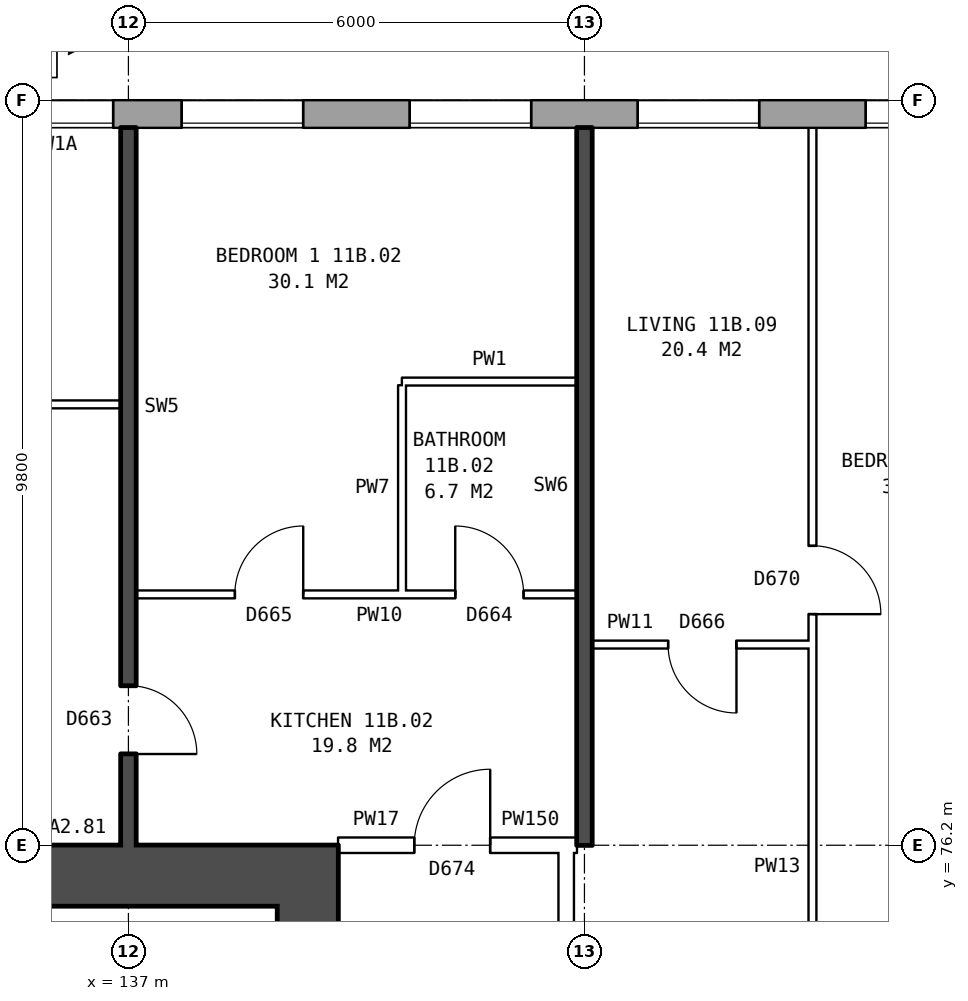
"""IFC4 building model, lengths in metres.
Left out: names, types, materials, properties, quantities, classifications, styles, units other than length and angle.
Written with IfcOpenShell. Run it as: python <this file> out.ifc"""

import sys

from ifc_helpers import new_model, si_unit, direction, frame, frame_2d, origin, place, context, subcontext, project, spatial, rectangle, extrude, element, fill, save


model = new_model("IFC4")
c1 = context("Model", 3, precision=1e-05, world=origin(), true_north=direction((0.0, 1.0)))
c2 = subcontext(c1, "Body", "Model", "MODEL_VIEW")
j1 = project(units=[si_unit("LENGTHUNIT", "METRE"), si_unit("PLANEANGLEUNIT", "RADIAN")], contexts=[c1])
p1 = place(None, origin())
s1 = spatial("IfcSite", under=j1, at=p1, CompositionType="ELEMENT")
p2 = place(p1, origin())
s2 = spatial("IfcBuilding", under=s1, at=p2, CompositionType="ELEMENT")
p3 = place(p2, frame((0.0, 0.0, 44.3)))
s3 = spatial("IfcBuildingStorey", under=s2, at=p3, CompositionType="ELEMENT", Elevation=44.3)
p4 = place(p3, frame((173.425, 85.82, 0.0), z_axis=(0.0, 0.0, 1.0), x_axis=(-1.0, 0.0, 0.0)))
e1 = element("IfcWall", 1, at=p4, inside=s3, PredefinedType="STANDARD", context=c2, shape_type="SweptSolid", body=[
    extrude(rectangle(XDim=39.351, YDim=0.36, at=frame_2d((19.675, 0.0))), origin(), (0.0, 0.0, 1.0), 2.85),
])
p5 = place(p4, frame((1.125, 0.0, 0.8)))
e2 = element("IfcOpeningElement", 2, at=p5, cuts=e1, PredefinedType="OPENING", context=c2, shape_type="SweptSolid", body=[
    extrude(rectangle(XDim=1.6, YDim=1.8, at=frame_2d((0.8, 0.9))), frame((0.0, 0.19, 0.0), z_axis=(0.0, -1.0, 0.0), x_axis=(1.0, 0.0, 0.0)), (0.0, 0.0, 1.0), 0.38),
])
p6 = place(p4, frame((4.125, 0.0, 0.8)))
e3 = element("IfcOpeningElement", 3, at=p6, cuts=e1, PredefinedType="OPENING", context=c2, shape_type="SweptSolid", body=[
    extrude(rectangle(XDim=1.6, YDim=1.8, at=frame_2d((0.8, 0.9))), frame((0.0, 0.19, 0.0), z_axis=(0.0, -1.0, 0.0), x_axis=(1.0, 0.0, 0.0)), (0.0, 0.0, 1.0), 0.38),
])
p7 = place(p4, frame((7.125, 0.0, 0.8)))
e4 = element("IfcOpeningElement", 4, at=p7, cuts=e1, PredefinedType="OPENING", context=c2, shape_type="SweptSolid", body=[
    extrude(rectangle(XDim=1.6, YDim=1.8, at=frame_2d((0.8, 0.9))), frame((0.0, 0.19, 0.0), z_axis=(0.0, -1.0, 0.0), x_axis=(1.0, 0.0, 0.0)), (0.0, 0.0, 1.0), 0.38),
])
p8 = place(p4, frame((10.125, 0.0, 0.8)))
e5 = element("IfcOpeningElement", 5, at=p8, cuts=e1, PredefinedType="OPENING", context=c2, shape_type="SweptSolid", body=[
    extrude(rectangle(XDim=1.6, YDim=1.8, at=frame_2d((0.8, 0.9))), frame((0.0, 0.19, 0.0), z_axis=(0.0, -1.0, 0.0), x_axis=(1.0, 0.0, 0.0)), (0.0, 0.0, 1.0), 0.38),
])
p9 = place(p4, frame((13.125, 0.0, 0.8)))
e6 = element("IfcOpeningElement", 6, at=p9, cuts=e1, PredefinedType="OPENING", context=c2, shape_type="SweptSolid", body=[
    extrude(rectangle(XDim=1.6, YDim=1.8, at=frame_2d((0.8, 0.9))), frame((0.0, 0.19, 0.0), z_axis=(0.0, -1.0, 0.0), x_axis=(1.0, 0.0, 0.0)), (0.0, 0.0, 1.0), 0.38),
])
p10 = place(p4, frame((16.125, 0.0, 0.8)))
e7 = element("IfcOpeningElement", 7, at=p10, cuts=e1, PredefinedType="OPENING", context=c2, shape_type="SweptSolid", body=[
    extrude(rectangle(XDim=1.6, YDim=1.8, at=frame_2d((0.8, 0.9))), frame((0.0, 0.19, 0.0), z_axis=(0.0, -1.0, 0.0), x_axis=(1.0, 0.0, 0.0)), (0.0, 0.0, 1.0), 0.38),
])
p11 = place(p4, frame((19.125, 0.0, 0.8)))
e8 = element("IfcOpeningElement", 8, at=p11, cuts=e1, PredefinedType="OPENING", context=c2, shape_type="SweptSolid", body=[
    extrude(rectangle(XDim=1.6, YDim=1.8, at=frame_2d((0.8, 0.9))), frame((0.0, 0.19, 0.0), z_axis=(0.0, -1.0, 0.0), x_axis=(1.0, 0.0, 0.0)), (0.0, 0.0, 1.0), 0.38),
])
p12 = place(p4, frame((22.125, 0.0, 0.8)))
e9 = element("IfcOpeningElement", 9, at=p12, cuts=e1, PredefinedType="OPENING", context=c2, shape_type="SweptSolid", body=[
    extrude(rectangle(XDim=1.6, YDim=1.8, at=frame_2d((0.8, 0.9))), frame((0.0, 0.19, 0.0), z_axis=(0.0, -1.0, 0.0), x_axis=(1.0, 0.0, 0.0)), (0.0, 0.0, 1.0), 0.38),
])
p13 = place(p4, frame((25.125, 0.0, 0.8)))
e10 = element("IfcOpeningElement", 10, at=p13, cuts=e1, PredefinedType="OPENING", context=c2, shape_type="SweptSolid", body=[
    extrude(rectangle(XDim=1.6, YDim=1.8, at=frame_2d((0.8, 0.9))), frame((0.0, 0.19, 0.0), z_axis=(0.0, -1.0, 0.0), x_axis=(1.0, 0.0, 0.0)), (0.0, 0.0, 1.0), 0.38),
])
p14 = place(p4, frame((28.125, 0.0, 0.8)))
e11 = element("IfcOpeningElement", 11, at=p14, cuts=e1, PredefinedType="OPENING", context=c2, shape_type="SweptSolid", body=[
    extrude(rectangle(XDim=1.6, YDim=1.8, at=frame_2d((0.8, 0.9))), frame((0.0, 0.19, 0.0), z_axis=(0.0, -1.0, 0.0), x_axis=(1.0, 0.0, 0.0)), (0.0, 0.0, 1.0), 0.38),
])
p15 = place(p4, frame((31.125, 0.0, 0.8)))
e12 = element("IfcOpeningElement", 12, at=p15, cuts=e1, PredefinedType="OPENING", context=c2, shape_type="SweptSolid", body=[
    extrude(rectangle(XDim=1.6, YDim=1.8, at=frame_2d((0.8, 0.9))), frame((0.0, 0.19, 0.0), z_axis=(0.0, -1.0, 0.0), x_axis=(1.0, 0.0, 0.0)), (0.0, 0.0, 1.0), 0.38),
])
p16 = place(p4, frame((34.125, 0.0, 0.8)))
e13 = element("IfcOpeningElement", 13, at=p16, cuts=e1, PredefinedType="OPENING", context=c2, shape_type="SweptSolid", body=[
    extrude(rectangle(XDim=1.6, YDim=1.8, at=frame_2d((0.8, 0.9))), frame((0.0, 0.19, 0.0), z_axis=(0.0, -1.0, 0.0), x_axis=(1.0, 0.0, 0.0)), (0.0, 0.0, 1.0), 0.38),
])
p17 = place(p4, frame((36.625, 0.0, 0.8)))
e14 = element("IfcOpeningElement", 14, at=p17, cuts=e1, PredefinedType="OPENING", context=c2, shape_type="SweptSolid", body=[
    extrude(rectangle(XDim=1.4, YDim=1.8, at=frame_2d((0.7, 0.9))), frame((0.0, 0.19, 0.0), z_axis=(0.0, -1.0, 0.0), x_axis=(1.0, 0.0, 0.0)), (0.0, 0.0, 1.0), 0.38),
])
p18 = place(p4, frame((38.325, 0.0, 0.8)))
e15 = element("IfcOpeningElement", 15, at=p18, cuts=e1, PredefinedType="OPENING", context=c2, shape_type="SweptSolid", body=[
    extrude(rectangle(XDim=0.6, YDim=0.9, at=frame_2d((0.3, 0.45))), frame((0.0, 0.19, 0.0), z_axis=(0.0, -1.0, 0.0), x_axis=(1.0, 0.0, 0.0)), (0.0, 0.0, 1.0), 0.38),
])
p19 = place(p3, frame((139.36, 64.6, 0.0), z_axis=(0.0, 0.0, 1.0), x_axis=(0.0, 1.0, 0.0)))
e16 = element("IfcWall", 16, at=p19, inside=s3, PredefinedType="SHEAR", context=c2, shape_type="SweptSolid", body=[
    extrude(rectangle(XDim=10.8, YDim=0.8, at=frame_2d((5.4, 0.0))), origin(), (0.0, 0.0, 1.0), 2.85),
])
p20 = place(p19, frame((0.525, 0.0, 0.0)))
e17 = element("IfcOpeningElement", 17, at=p20, cuts=e16, PredefinedType="OPENING", context=c2, shape_type="SweptSolid", body=[
    extrude(rectangle(XDim=1.1, YDim=2.1, at=frame_2d((0.55, 1.05))), frame((0.0, 0.41, 0.0), z_axis=(0.0, -1.0, 0.0), x_axis=(1.0, 0.0, 0.0)), (0.0, 0.0, 1.0), 0.82),
])
p21 = place(p19, frame((9.1, 0.0, 0.0)))
e18 = element("IfcOpeningElement", 18, at=p21, cuts=e16, PredefinedType="OPENING", context=c2, shape_type="SweptSolid", body=[
    extrude(rectangle(XDim=1.1, YDim=2.1, at=frame_2d((0.55, 1.05))), frame((0.0, 0.41, 0.0), z_axis=(0.0, -1.0, 0.0), x_axis=(1.0, 0.0, 0.0)), (0.0, 0.0, 1.0), 0.82),
])
p22 = place(p19, frame((7.325, 0.0, 0.0)))
e19 = element("IfcOpeningElement", 19, at=p22, cuts=e16, PredefinedType="OPENING", context=c2, shape_type="SweptSolid", body=[
    extrude(rectangle(XDim=0.85, YDim=2.1, at=frame_2d((0.425, 1.05))), frame((0.0, 0.41, 0.0), z_axis=(0.0, -1.0, 0.0), x_axis=(1.0, 0.0, 0.0)), (0.0, 0.0, 1.0), 0.82),
])
p23 = place(p3, frame((139.76, 75.8, 0.0), z_axis=(0.0, 0.0, 1.0), x_axis=(-1.0, 0.0, 0.0)))
e20 = element("IfcWall", 20, at=p23, inside=s3, PredefinedType="SHEAR", context=c2, shape_type="SweptSolid", body=[
    extrude(rectangle(XDim=8.4, YDim=0.8, at=frame_2d((4.2, 0.0))), origin(), (0.0, 0.0, 1.0), 2.85),
])
p24 = place(p3, frame((142.76, 63.9, 0.0), z_axis=(0.0, 0.0, 1.0), x_axis=(0.0, 1.0, 0.0)))
e21 = element("IfcWall", 21, at=p24, inside=s3, PredefinedType="PARTITIONING", context=c2, shape_type="SweptSolid", body=[
    extrude(rectangle(XDim=12.2, YDim=0.2, at=frame_2d((6.1, 0.0))), origin(), (0.0, 0.0, 1.0), 2.85),
])
p25 = place(p24, frame((5.1, 0.0, 0.0)))
e22 = element("IfcOpeningElement", 22, at=p25, cuts=e21, PredefinedType="OPENING", context=c2, shape_type="SweptSolid", body=[
    extrude(rectangle(XDim=2.0, YDim=2.1, at=frame_2d((1.0, 1.05))), frame((0.0, 0.11, 0.0), z_axis=(0.0, -1.0, 0.0), x_axis=(1.0, 0.0, 0.0)), (0.0, 0.0, 1.0), 0.22),
])
p26 = place(p3, frame((139.76, 76.2, 0.0), z_axis=(0.0, 0.0, 1.0), x_axis=(1.0, 0.0, 0.0)))
e23 = element("IfcWall", 23, at=p26, inside=s3, PredefinedType="PARTITIONING", context=c2, shape_type="SweptSolid", body=[
    extrude(rectangle(XDim=3.0, YDim=0.2, at=frame_2d((1.5, 0.0))), origin(), (0.0, 0.0, 1.0), 2.85),
])
p27 = place(p26, frame((1.0, 0.0, 0.0)))
e24 = element("IfcOpeningElement", 24, at=p27, cuts=e23, PredefinedType="OPENING", context=c2, shape_type="SweptSolid", body=[
    extrude(rectangle(XDim=1.0, YDim=2.1, at=frame_2d((0.5, 1.05))), frame((0.0, 0.11, 0.0), z_axis=(0.0, -1.0, 0.0), x_axis=(1.0, 0.0, 0.0)), (0.0, 0.0, 1.0), 0.22),
])
p28 = place(p3, frame((142.76, 76.2, 0.0), z_axis=(0.0, 0.0, 1.0), x_axis=(1.0, 0.0, 0.0)))
e25 = element("IfcWall", 25, at=p28, inside=s3, PredefinedType="PARTITIONING", context=c2, shape_type="SweptSolid", body=[
    extrude(rectangle(XDim=0.14, YDim=0.2, at=frame_2d((0.07, 0.0))), origin(), (0.0, 0.0, 1.0), 2.85),
])
p29 = place(p3, frame((143.1, 78.84, 0.0), z_axis=(0.0, 0.0, 1.0), x_axis=(1.0, 0.0, 0.0)))
e26 = element("IfcWall", 26, at=p29, inside=s3, PredefinedType="PARTITIONING", context=c2, shape_type="SweptSolid", body=[
    extrude(rectangle(XDim=2.9, YDim=0.1, at=frame_2d((1.45, 0.0))), origin(), (0.0, 0.0, 1.0), 2.85),
])
p30 = place(p29, frame((1.0, 0.0, 0.0)))
e27 = element("IfcOpeningElement", 27, at=p30, cuts=e26, PredefinedType="OPENING", context=c2, shape_type="SweptSolid", body=[
    extrude(rectangle(XDim=0.9, YDim=2.1, at=frame_2d((0.45, 1.05))), frame((0.0, 0.06, 0.0), z_axis=(0.0, -1.0, 0.0), x_axis=(1.0, 0.0, 0.0)), (0.0, 0.0, 1.0), 0.12),
])
p31 = place(p3, frame((137.1, 79.5, 0.0), z_axis=(0.0, 0.0, 1.0), x_axis=(1.0, 0.0, 0.0)))
e28 = element("IfcWall", 28, at=p31, inside=s3, PredefinedType="PARTITIONING", context=c2, shape_type="SweptSolid", body=[
    extrude(rectangle(XDim=5.8, YDim=0.1, at=frame_2d((2.9, 0.0))), origin(), (0.0, 0.0, 1.0), 2.85),
])
p32 = place(p31, frame((1.3, 0.0, 0.0)))
e29 = element("IfcOpeningElement", 29, at=p32, cuts=e28, PredefinedType="OPENING", context=c2, shape_type="SweptSolid", body=[
    extrude(rectangle(XDim=0.9, YDim=2.1, at=frame_2d((0.45, 1.05))), frame((0.0, 0.06, 0.0), z_axis=(0.0, -1.0, 0.0), x_axis=(1.0, 0.0, 0.0)), (0.0, 0.0, 1.0), 0.12),
])
p33 = place(p31, frame((4.2, 0.0, 0.0)))
e30 = element("IfcOpeningElement", 30, at=p33, cuts=e28, PredefinedType="OPENING", context=c2, shape_type="SweptSolid", body=[
    extrude(rectangle(XDim=0.9, YDim=2.1, at=frame_2d((0.45, 1.05))), frame((0.0, 0.06, 0.0), z_axis=(0.0, -1.0, 0.0), x_axis=(1.0, 0.0, 0.0)), (0.0, 0.0, 1.0), 0.12),
])
p34 = place(p3, frame((131.36, 82.0, 0.0), z_axis=(0.0, 0.0, 1.0), x_axis=(1.0, 0.0, 0.0)))
e31 = element("IfcWall", 31, at=p34, inside=s3, PredefinedType="PARTITIONING", context=c2, shape_type="SweptSolid", body=[
    extrude(rectangle(XDim=5.54, YDim=0.1, at=frame_2d((2.77, 0.0))), origin(), (0.0, 0.0, 1.0), 2.85),
])
p35 = place(p34, frame((2.32, 0.0, 0.0)))
e32 = element("IfcOpeningElement", 32, at=p35, cuts=e31, PredefinedType="OPENING", context=c2, shape_type="SweptSolid", body=[
    extrude(rectangle(XDim=0.9, YDim=2.1, at=frame_2d((0.45, 1.05))), frame((0.0, 0.06, 0.0), z_axis=(0.0, -1.0, 0.0), x_axis=(1.0, 0.0, 0.0)), (0.0, 0.0, 1.0), 0.12),
])
p36 = place(p3, frame((140.6, 82.3, 0.0), z_axis=(0.0, 0.0, 1.0), x_axis=(1.0, 0.0, 0.0)))
e33 = element("IfcWall", 33, at=p36, inside=s3, PredefinedType="PARTITIONING", context=c2, shape_type="SweptSolid", body=[
    extrude(rectangle(XDim=2.3, YDim=0.1, at=frame_2d((1.15, 0.0))), origin(), (0.0, 0.0, 1.0), 2.85),
])
p37 = place(p3, frame((137.0, 76.2, 0.0), z_axis=(0.0, 0.0, 1.0), x_axis=(0.0, 1.0, 0.0)))
e34 = element("IfcWall", 34, at=p37, inside=s3, PredefinedType="SOLIDWALL", context=c2, shape_type="SweptSolid", body=[
    extrude(rectangle(XDim=9.44, YDim=0.2, at=frame_2d((4.72, 0.0))), origin(), (0.0, 0.0, 1.0), 2.85),
])
p38 = place(p37, frame((1.2, 0.0, 0.0)))
e35 = element("IfcOpeningElement", 35, at=p38, cuts=e34, PredefinedType="OPENING", context=c2, shape_type="SweptSolid", body=[
    extrude(rectangle(XDim=0.9, YDim=2.1, at=frame_2d((0.45, 1.05))), frame((0.0, 0.11, 0.0), z_axis=(0.0, -1.0, 0.0), x_axis=(1.0, 0.0, 0.0)), (0.0, 0.0, 1.0), 0.22),
])
p39 = place(p3, frame((140.6, 79.55, 0.0), z_axis=(0.0, 0.0, 1.0), x_axis=(0.0, 1.0, 0.0)))
e36 = element("IfcWall", 36, at=p39, inside=s3, PredefinedType="PARTITIONING", context=c2, shape_type="SweptSolid", body=[
    extrude(rectangle(XDim=2.7, YDim=0.1, at=frame_2d((1.35, 0.0))), origin(), (0.0, 0.0, 1.0), 2.85),
])
p40 = place(p3, frame((143.0, 76.2, 0.0), z_axis=(0.0, 0.0, 1.0), x_axis=(0.0, 1.0, 0.0)))
e37 = element("IfcWall", 37, at=p40, inside=s3, PredefinedType="SOLIDWALL", context=c2, shape_type="SweptSolid", body=[
    extrude(rectangle(XDim=9.44, YDim=0.2, at=frame_2d((4.72, 0.0))), origin(), (0.0, 0.0, 1.0), 2.85),
])
p41 = place(p3, frame((146.0, 71.3, 0.0), z_axis=(0.0, 0.0, 1.0), x_axis=(0.0, 1.0, 0.0)))
e38 = element("IfcWall", 38, at=p41, inside=s3, PredefinedType="PARTITIONING", context=c2, shape_type="SweptSolid", body=[
    extrude(rectangle(XDim=14.34, YDim=0.1, at=frame_2d((7.17, 0.0))), origin(), (0.0, 0.0, 1.0), 2.85),
])
p42 = place(p41, frame((7.94, 0.0, 0.0)))
e39 = element("IfcOpeningElement", 39, at=p42, cuts=e38, PredefinedType="OPENING", context=c2, shape_type="SweptSolid", body=[
    extrude(rectangle(XDim=0.9, YDim=2.1, at=frame_2d((0.45, 1.05))), frame((0.0, 0.06, 0.0), z_axis=(0.0, -1.0, 0.0), x_axis=(1.0, 0.0, 0.0)), (0.0, 0.0, 1.0), 0.12),
])
p43 = place(p41, frame((0.4, 0.0, 0.0)))
e40 = element("IfcOpeningElement", 40, at=p43, cuts=e38, PredefinedType="OPENING", context=c2, shape_type="SweptSolid", body=[
    extrude(rectangle(XDim=0.9, YDim=2.1, at=frame_2d((0.45, 1.05))), frame((0.0, 0.06, 0.0), z_axis=(0.0, -1.0, 0.0), x_axis=(1.0, 0.0, 0.0)), (0.0, 0.0, 1.0), 0.12),
])
p44 = place(p13, origin())
e41 = element("IfcWindow", 41, at=p44, inside=s3, PartitioningType="SINGLE_PANEL", PredefinedType="WINDOW", context=c2, shape_type="SweptSolid", body=[
    extrude(rectangle(XDim=1.6, YDim=1.8, at=frame_2d((0.8, 0.9))), frame((0.0, 0.15, 0.0), z_axis=(0.0, -1.0, 0.0), x_axis=(1.0, 0.0, 0.0)), (0.0, 0.0, 1.0), 0.06),
])
fill(e10, e41)
p45 = place(p14, origin())
e42 = element("IfcWindow", 42, at=p45, inside=s3, PartitioningType="SINGLE_PANEL", PredefinedType="WINDOW", context=c2, shape_type="SweptSolid", body=[
    extrude(rectangle(XDim=1.6, YDim=1.8, at=frame_2d((0.8, 0.9))), frame((0.0, 0.15, 0.0), z_axis=(0.0, -1.0, 0.0), x_axis=(1.0, 0.0, 0.0)), (0.0, 0.0, 1.0), 0.06),
])
fill(e11, e42)
p46 = place(p15, origin())
e43 = element("IfcWindow", 43, at=p46, inside=s3, PartitioningType="SINGLE_PANEL", PredefinedType="WINDOW", context=c2, shape_type="SweptSolid", body=[
    extrude(rectangle(XDim=1.6, YDim=1.8, at=frame_2d((0.8, 0.9))), frame((0.0, 0.15, 0.0), z_axis=(0.0, -1.0, 0.0), x_axis=(1.0, 0.0, 0.0)), (0.0, 0.0, 1.0), 0.06),
])
fill(e12, e43)
p47 = place(p16, origin())
e44 = element("IfcWindow", 44, at=p47, inside=s3, PartitioningType="SINGLE_PANEL", PredefinedType="WINDOW", context=c2, shape_type="SweptSolid", body=[
    extrude(rectangle(XDim=1.6, YDim=1.8, at=frame_2d((0.8, 0.9))), frame((0.0, 0.15, 0.0), z_axis=(0.0, -1.0, 0.0), x_axis=(1.0, 0.0, 0.0)), (0.0, 0.0, 1.0), 0.06),
])
fill(e13, e44)
p48 = place(p17, origin())
e45 = element("IfcWindow", 45, at=p48, inside=s3, PartitioningType="SINGLE_PANEL", PredefinedType="WINDOW", context=c2, shape_type="SweptSolid", body=[
    extrude(rectangle(XDim=1.4, YDim=1.8, at=frame_2d((0.7, 0.9))), frame((0.0, 0.15, 0.0), z_axis=(0.0, -1.0, 0.0), x_axis=(1.0, 0.0, 0.0)), (0.0, 0.0, 1.0), 0.06),
])
fill(e14, e45)
p49 = place(p32, origin())
e46 = element("IfcDoor", 46, at=p49, inside=s3, OperationType="SINGLE_SWING_RIGHT", PredefinedType="DOOR", context=c2, shape_type="SweptSolid", body=[
    extrude(rectangle(XDim=0.9, YDim=2.1, at=frame_2d((0.45, 1.05))), frame((0.0, 0.025, 0.0), z_axis=(0.0, -1.0, 0.0), x_axis=(1.0, 0.0, 0.0)), (0.0, 0.0, 1.0), 0.05),
])
fill(e29, e46)
p50 = place(p27, origin())
e47 = element("IfcDoor", 47, at=p50, inside=s3, OperationType="SINGLE_SWING_RIGHT", PredefinedType="DOOR", context=c2, shape_type="SweptSolid", body=[
    extrude(rectangle(XDim=1.0, YDim=2.1, at=frame_2d((0.5, 1.05))), frame((0.0, 0.025, 0.0), z_axis=(0.0, -1.0, 0.0), x_axis=(1.0, 0.0, 0.0)), (0.0, 0.0, 1.0), 0.05),
])
fill(e24, e47)
p51 = place(p38, frame((0.9, 0.0, 0.0), z_axis=(0.0, 0.0, 1.0), x_axis=(-1.0, 0.0, 0.0)))
e48 = element("IfcDoor", 48, at=p51, inside=s3, OperationType="SINGLE_SWING_RIGHT", PredefinedType="DOOR", context=c2, shape_type="SweptSolid", body=[
    extrude(rectangle(XDim=0.9, YDim=2.1, at=frame_2d((0.45, 1.05))), frame((0.0, 0.025, 0.0), z_axis=(0.0, -1.0, 0.0), x_axis=(1.0, 0.0, 0.0)), (0.0, 0.0, 1.0), 0.05),
])
fill(e35, e48)
p52 = place(p33, origin())
e49 = element("IfcDoor", 49, at=p52, inside=s3, OperationType="SINGLE_SWING_LEFT", PredefinedType="DOOR", context=c2, shape_type="SweptSolid", body=[
    extrude(rectangle(XDim=0.9, YDim=2.1, at=frame_2d((0.45, 1.05))), frame((0.0, 0.025, 0.0), z_axis=(0.0, -1.0, 0.0), x_axis=(1.0, 0.0, 0.0)), (0.0, 0.0, 1.0), 0.05),
])
fill(e30, e49)
p53 = place(p42, frame((0.9, 0.0, 0.0), z_axis=(0.0, 0.0, 1.0), x_axis=(-1.0, 0.0, 0.0)))
e50 = element("IfcDoor", 50, at=p53, inside=s3, OperationType="SINGLE_SWING_RIGHT", PredefinedType="DOOR", context=c2, shape_type="SweptSolid", body=[
    extrude(rectangle(XDim=0.9, YDim=2.1, at=frame_2d((0.45, 1.05))), frame((0.0, 0.025, 0.0), z_axis=(0.0, -1.0, 0.0), x_axis=(1.0, 0.0, 0.0)), (0.0, 0.0, 1.0), 0.05),
])
fill(e39, e50)
p54 = place(p30, frame((0.9, 0.0, 0.0), z_axis=(0.0, 0.0, 1.0), x_axis=(-1.0, 0.0, 0.0)))
e51 = element("IfcDoor", 51, at=p54, inside=s3, OperationType="SINGLE_SWING_LEFT", PredefinedType="DOOR", context=c2, shape_type="SweptSolid", body=[
    extrude(rectangle(XDim=0.9, YDim=2.1, at=frame_2d((0.45, 1.05))), frame((0.0, 0.025, 0.0), z_axis=(0.0, -1.0, 0.0), x_axis=(1.0, 0.0, 0.0)), (0.0, 0.0, 1.0), 0.05),
])
fill(e27, e51)
save(model, sys.argv[1])
